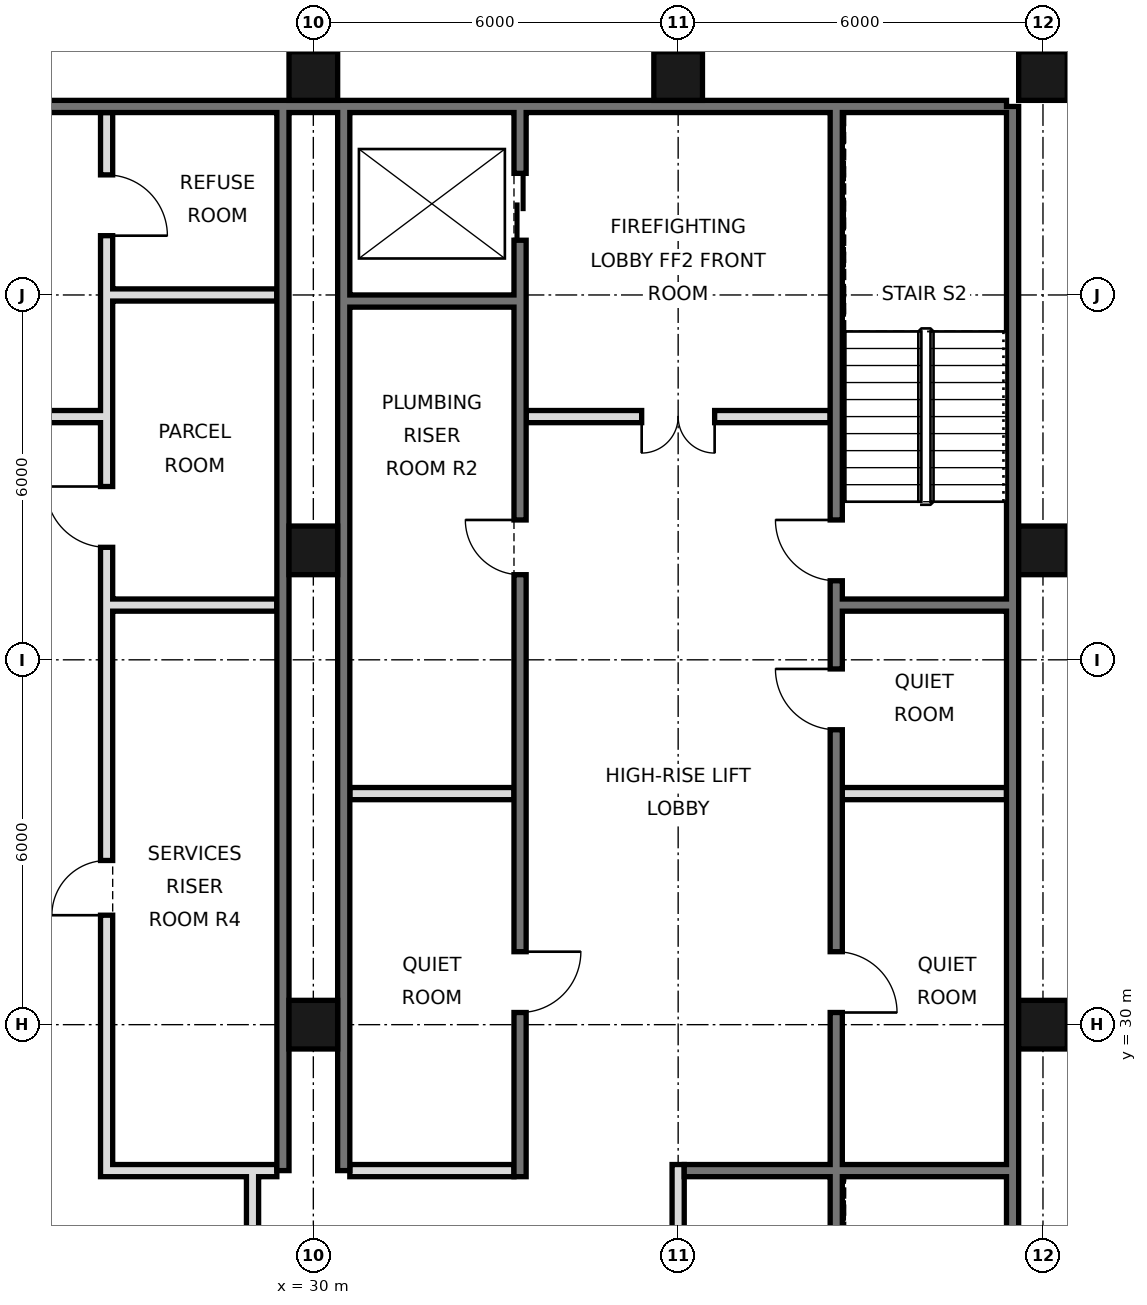
"""IFC4 building model, lengths in metres.
Left out: names, types, materials, properties, quantities, classifications, styles, units other than length and angle.
Written with IfcOpenShell. Run it as: python <this file> out.ifc"""

import sys

from ifc_helpers import new_model, si_unit, direction, frame, frame_2d, origin, origin_2d, place, context, subcontext, project, spatial, rectangle, hollow_rectangle, extrude, element, fill, save


model = new_model("IFC4")
c1 = context("Model", 3, precision=1e-05, world=origin(), true_north=direction((0.0, 1.0)))
c2 = subcontext(c1, "Body", "Model", "MODEL_VIEW")
j1 = project(units=[si_unit("LENGTHUNIT", "METRE"), si_unit("PLANEANGLEUNIT", "RADIAN")], contexts=[c1])
p1 = place(None, origin())
s1 = spatial("IfcSite", under=j1, at=p1, CompositionType="ELEMENT")
p2 = place(p1, origin())
s2 = spatial("IfcBuilding", under=s1, at=p2, CompositionType="ELEMENT")
p3 = place(p2, frame((0.0, 0.0, 53.4)))
s3 = spatial("IfcBuildingStorey", under=s2, at=p3, CompositionType="ELEMENT", Elevation=53.4)
for number, where, z_axis, x_axis in (
    (1, (30.0, 30.0, 0.0), (0.0, 0.0, 1.0), (1.0, 0.0, 0.0)),
    (2, (30.0, 37.8, 0.0), (0.0, 0.0, 1.0), (1.0, 0.0, 0.0)),
    (3, (30.0, 45.6, 0.0), (0.0, 0.0, 1.0), (1.0, 0.0, 0.0)),
    (4, (36.0, 45.6, 0.0), (0.0, 0.0, 1.0), (1.0, 0.0, 0.0)),
    (5, (42.0, 30.0, 0.0), (0.0, 0.0, 1.0), (1.0, 0.0, 0.0)),
    (6, (42.0, 37.8, 0.0), (0.0, 0.0, 1.0), (1.0, 0.0, 0.0)),
    (7, (42.0, 45.6, 0.0), (0.0, 0.0, 1.0), (1.0, 0.0, 0.0)),
):
    element("IfcColumn", number, at=place(p3, frame(where, z_axis=z_axis, x_axis=x_axis)), inside=s3, PredefinedType="COLUMN", context=c2, shape_type="SweptSolid", body=[
        extrude(hollow_rectangle(XDim=0.8, YDim=0.8, WallThickness=0.06, at=origin_2d()), origin(), (0.0, 0.0, 1.0), 3.6),
    ])
p4 = place(p3, frame((41.5, 21.6, 0.0), z_axis=(0.0, 0.0, 1.0), x_axis=(0.0, 1.0, 0.0)))
e8 = element("IfcWall", 8, at=p4, inside=s3, PredefinedType="SOLIDWALL", context=c2, shape_type="SweptSolid", body=[
    extrude(rectangle(XDim=23.5, YDim=0.2, at=frame_2d((11.75, 0.0))), origin(), (0.0, 0.0, 1.0), 3.42),
])
p5 = place(p3, frame((6.6, 45.1, 0.0), z_axis=(0.0, 0.0, 1.0), x_axis=(1.0, 0.0, 0.0)))
e9 = element("IfcWall", 9, at=p5, inside=s3, PredefinedType="SOLIDWALL", context=c2, shape_type="SweptSolid", body=[
    extrude(rectangle(XDim=34.8, YDim=0.2, at=frame_2d((17.4, 0.0))), origin(), (0.0, 0.0, 1.0), 3.42),
])
for number, where, z_axis, x_axis in (
    (10, (29.5, 27.6, 0.0), (0.0, 0.0, 1.0), (0.0, 1.0, 0.0)),
    (11, (30.5, 27.6, 0.0), (0.0, 0.0, 1.0), (0.0, 1.0, 0.0)),
):
    element("IfcWall", number, at=place(p3, frame(where, z_axis=z_axis, x_axis=x_axis)), inside=s3, PredefinedType="SOLIDWALL", context=c2, shape_type="SweptSolid", body=[
        extrude(rectangle(XDim=17.5, YDim=0.2, at=frame_2d((8.75, 0.0))), origin(), (0.0, 0.0, 1.0), 3.42),
    ])
p6 = place(p3, frame((29.0, 21.6, 0.0), z_axis=(0.0, 0.0, 1.0), x_axis=(0.0, 1.0, 0.0)))
e12 = element("IfcWall", 12, at=p6, inside=s3, PredefinedType="PARTITIONING", context=c2, shape_type="SweptSolid", body=[
    extrude(rectangle(XDim=6.0, YDim=0.2, at=frame_2d((3.0, 0.0))), origin(), (0.0, 0.0, 1.0), 3.42),
])
p7 = place(p6, frame((2.1, 0.0, 0.0)))
e13 = element("IfcOpeningElement", 13, at=p7, cuts=e12, PredefinedType="OPENING", context=c2, shape_type="SweptSolid", body=[
    extrude(rectangle(XDim=1.8, YDim=2.1, at=frame_2d((0.9, 1.05))), frame((0.0, 0.11, 0.0), z_axis=(0.0, -1.0, 0.0), x_axis=(1.0, 0.0, 0.0)), (0.0, 0.0, 1.0), 0.22),
])
p8 = place(p3, frame((26.6, 27.5, 0.0), z_axis=(0.0, 0.0, 1.0), x_axis=(0.0, 1.0, 0.0)))
e14 = element("IfcWall", 14, at=p8, inside=s3, PredefinedType="SOLIDWALL", context=c2, shape_type="SweptSolid", body=[
    extrude(rectangle(XDim=17.5, YDim=0.2, at=frame_2d((8.75, 0.0))), origin(), (0.0, 0.0, 1.0), 3.42),
])
p9 = place(p8, frame((4.3, 0.0, 0.0)))
e15 = element("IfcOpeningElement", 15, at=p9, cuts=e14, PredefinedType="OPENING", context=c2, shape_type="SweptSolid", body=[
    extrude(rectangle(XDim=0.9, YDim=2.1, at=frame_2d((0.45, 1.05))), frame((0.0, 0.11, 0.0), z_axis=(0.0, -1.0, 0.0), x_axis=(1.0, 0.0, 0.0)), (0.0, 0.0, 1.0), 0.22),
])
p10 = place(p8, frame((10.35, 0.0, 0.0)))
e16 = element("IfcOpeningElement", 16, at=p10, cuts=e14, PredefinedType="OPENING", context=c2, shape_type="SweptSolid", body=[
    extrude(rectangle(XDim=1.0, YDim=2.1, at=frame_2d((0.5, 1.05))), frame((0.0, 0.11, 0.0), z_axis=(0.0, -1.0, 0.0), x_axis=(1.0, 0.0, 0.0)), (0.0, 0.0, 1.0), 0.22),
])
p11 = place(p8, frame((15.475, 0.0, 0.0)))
e17 = element("IfcOpeningElement", 17, at=p11, cuts=e14, PredefinedType="OPENING", context=c2, shape_type="SweptSolid", body=[
    extrude(rectangle(XDim=1.0, YDim=2.1, at=frame_2d((0.5, 1.05))), frame((0.0, 0.11, 0.0), z_axis=(0.0, -1.0, 0.0), x_axis=(1.0, 0.0, 0.0)), (0.0, 0.0, 1.0), 0.22),
])
p12 = place(p3, frame((33.4, 27.5, 0.0), z_axis=(0.0, 0.0, 1.0), x_axis=(0.0, 1.0, 0.0)))
e18 = element("IfcWall", 18, at=p12, inside=s3, PredefinedType="SOLIDWALL", context=c2, shape_type="SweptSolid", body=[
    extrude(rectangle(XDim=17.5, YDim=0.2, at=frame_2d((8.75, 0.0))), origin(), (0.0, 0.0, 1.0), 3.42),
])
p13 = place(p12, frame((15.4, 0.0, 0.0)))
e19 = element("IfcOpeningElement", 19, at=p13, cuts=e18, PredefinedType="OPENING", context=c2, shape_type="SweptSolid", body=[
    extrude(rectangle(XDim=1.1, YDim=2.1, at=frame_2d((0.55, 1.05))), frame((0.0, 0.11, 0.0), z_axis=(0.0, -1.0, 0.0), x_axis=(1.0, 0.0, 0.0)), (0.0, 0.0, 1.0), 0.22),
])
p14 = place(p12, frame((2.7, 0.0, 0.0)))
e20 = element("IfcOpeningElement", 20, at=p14, cuts=e18, PredefinedType="OPENING", context=c2, shape_type="SweptSolid", body=[
    extrude(rectangle(XDim=1.0, YDim=2.1, at=frame_2d((0.5, 1.05))), frame((0.0, 0.11, 0.0), z_axis=(0.0, -1.0, 0.0), x_axis=(1.0, 0.0, 0.0)), (0.0, 0.0, 1.0), 0.22),
])
p15 = place(p12, frame((9.9, 0.0, 0.0)))
e21 = element("IfcOpeningElement", 21, at=p15, cuts=e18, PredefinedType="OPENING", context=c2, shape_type="SweptSolid", body=[
    extrude(rectangle(XDim=0.9, YDim=2.1, at=frame_2d((0.45, 1.05))), frame((0.0, 0.11, 0.0), z_axis=(0.0, -1.0, 0.0), x_axis=(1.0, 0.0, 0.0)), (0.0, 0.0, 1.0), 0.22),
])
p16 = place(p3, frame((36.0, 21.6, 0.0), z_axis=(0.0, 0.0, 1.0), x_axis=(0.0, 1.0, 0.0)))
e22 = element("IfcWall", 22, at=p16, inside=s3, PredefinedType="PARTITIONING", context=c2, shape_type="SweptSolid", body=[
    extrude(rectangle(XDim=6.1, YDim=0.2, at=frame_2d((3.05, 0.0))), origin(), (0.0, 0.0, 1.0), 3.42),
])
p17 = place(p3, frame((38.6, 21.6, 0.0), z_axis=(0.0, 0.0, 1.0), x_axis=(0.0, 1.0, 0.0)))
e23 = element("IfcWall", 23, at=p17, inside=s3, PredefinedType="SOLIDWALL", context=c2, shape_type="SweptSolid", body=[
    extrude(rectangle(XDim=23.4, YDim=0.2, at=frame_2d((11.7, 0.0))), origin(), (0.0, 0.0, 1.0), 3.42),
])
p18 = place(p17, frame((8.6, 0.0, 0.0)))
e24 = element("IfcOpeningElement", 24, at=p18, cuts=e23, PredefinedType="OPENING", context=c2, shape_type="SweptSolid", body=[
    extrude(rectangle(XDim=1.0, YDim=2.1, at=frame_2d((0.5, 1.05))), frame((0.0, 0.11, 0.0), z_axis=(0.0, -1.0, 0.0), x_axis=(1.0, 0.0, 0.0)), (0.0, 0.0, 1.0), 0.22),
])
p19 = place(p17, frame((13.25, 0.0, 0.0)))
e25 = element("IfcOpeningElement", 25, at=p19, cuts=e23, PredefinedType="OPENING", context=c2, shape_type="SweptSolid", body=[
    extrude(rectangle(XDim=1.0, YDim=2.1, at=frame_2d((0.5, 1.05))), frame((0.0, 0.11, 0.0), z_axis=(0.0, -1.0, 0.0), x_axis=(1.0, 0.0, 0.0)), (0.0, 0.0, 1.0), 0.22),
])
p20 = place(p17, frame((15.7, 0.0, 0.0)))
e26 = element("IfcOpeningElement", 26, at=p20, cuts=e23, PredefinedType="OPENING", context=c2, shape_type="SweptSolid", body=[
    extrude(rectangle(XDim=1.0, YDim=2.1, at=frame_2d((0.5, 1.05))), frame((0.0, 0.11, 0.0), z_axis=(0.0, -1.0, 0.0), x_axis=(1.0, 0.0, 0.0)), (0.0, 0.0, 1.0), 0.22),
])
p21 = place(p17, frame((0.175, 0.0, 0.0)))
e27 = element("IfcOpeningElement", 27, at=p21, cuts=e23, PredefinedType="OPENING", context=c2, shape_type="SweptSolid", body=[
    extrude(rectangle(XDim=0.9, YDim=2.1, at=frame_2d((0.45, 1.05))), frame((0.0, 0.11, 0.0), z_axis=(0.0, -1.0, 0.0), x_axis=(1.0, 0.0, 0.0)), (0.0, 0.0, 1.0), 0.22),
])
p22 = place(p3, frame((26.7, 27.6, 0.0), z_axis=(0.0, 0.0, 1.0), x_axis=(1.0, 0.0, 0.0)))
e28 = element("IfcWall", 28, at=p22, inside=s3, PredefinedType="SOLIDWALL", context=c2, shape_type="SweptSolid", body=[
    extrude(rectangle(XDim=2.7, YDim=0.2, at=frame_2d((1.35, 0.0))), origin(), (0.0, 0.0, 1.0), 3.42),
])
p23 = place(p3, frame((30.6, 27.6, 0.0), z_axis=(0.0, 0.0, 1.0), x_axis=(1.0, 0.0, 0.0)))
e29 = element("IfcWall", 29, at=p23, inside=s3, PredefinedType="PARTITIONING", context=c2, shape_type="SweptSolid", body=[
    extrude(rectangle(XDim=2.7, YDim=0.2, at=frame_2d((1.35, 0.0))), origin(), (0.0, 0.0, 1.0), 3.42),
])
p24 = place(p3, frame((36.1, 27.6, 0.0), z_axis=(0.0, 0.0, 1.0), x_axis=(1.0, 0.0, 0.0)))
e30 = element("IfcWall", 30, at=p24, inside=s3, PredefinedType="SOLIDWALL", context=c2, shape_type="SweptSolid", body=[
    extrude(rectangle(XDim=5.3, YDim=0.2, at=frame_2d((2.65, 0.0))), origin(), (0.0, 0.0, 1.0), 3.42),
])
p25 = place(p3, frame((30.6, 33.8, 0.0), z_axis=(0.0, 0.0, 1.0), x_axis=(1.0, 0.0, 0.0)))
e31 = element("IfcWall", 31, at=p25, inside=s3, PredefinedType="SOLIDWALL", context=c2, shape_type="SweptSolid", body=[
    extrude(rectangle(XDim=2.7, YDim=0.2, at=frame_2d((1.35, 0.0))), origin(), (0.0, 0.0, 1.0), 3.42),
])
p26 = place(p3, frame((38.7, 33.8, 0.0), z_axis=(0.0, 0.0, 1.0), x_axis=(1.0, 0.0, 0.0)))
e32 = element("IfcWall", 32, at=p26, inside=s3, PredefinedType="PARTITIONING", context=c2, shape_type="SweptSolid", body=[
    extrude(rectangle(XDim=2.7, YDim=0.2, at=frame_2d((1.35, 0.0))), origin(), (0.0, 0.0, 1.0), 3.42),
])
for number, where, z_axis, x_axis in (
    (33, (26.7, 36.9, 0.0), (0.0, 0.0, 1.0), (1.0, 0.0, 0.0)),
    (34, (38.7, 36.9, 0.0), (0.0, 0.0, 1.0), (1.0, 0.0, 0.0)),
):
    element("IfcWall", number, at=place(p3, frame(where, z_axis=z_axis, x_axis=x_axis)), inside=s3, PredefinedType="SOLIDWALL", context=c2, shape_type="SweptSolid", body=[
        extrude(rectangle(XDim=2.7, YDim=0.2, at=frame_2d((1.35, 0.0))), origin(), (0.0, 0.0, 1.0), 3.42),
    ])
p27 = place(p3, frame((21.5, 40.0, 0.0), z_axis=(0.0, 0.0, 1.0), x_axis=(1.0, 0.0, 0.0)))
e35 = element("IfcWall", 35, at=p27, inside=s3, PredefinedType="PARTITIONING", context=c2, shape_type="SweptSolid", body=[
    extrude(rectangle(XDim=5.0, YDim=0.2, at=frame_2d((2.5, 0.0))), origin(), (0.0, 0.0, 1.0), 3.42),
])
p28 = place(p27, frame((1.9, 0.0, 0.0)))
e36 = element("IfcOpeningElement", 36, at=p28, cuts=e35, PredefinedType="OPENING", context=c2, shape_type="SweptSolid", body=[
    extrude(rectangle(XDim=1.2, YDim=2.1, at=frame_2d((0.6, 1.05))), frame((0.0, 0.11, 0.0), z_axis=(0.0, -1.0, 0.0), x_axis=(1.0, 0.0, 0.0)), (0.0, 0.0, 1.0), 0.22),
])
p29 = place(p3, frame((33.5, 40.0, 0.0), z_axis=(0.0, 0.0, 1.0), x_axis=(1.0, 0.0, 0.0)))
e37 = element("IfcWall", 37, at=p29, inside=s3, PredefinedType="PARTITIONING", context=c2, shape_type="SweptSolid", body=[
    extrude(rectangle(XDim=5.0, YDim=0.2, at=frame_2d((2.5, 0.0))), origin(), (0.0, 0.0, 1.0), 3.42),
])
p30 = place(p29, frame((1.9, 0.0, 0.0)))
e38 = element("IfcOpeningElement", 38, at=p30, cuts=e37, PredefinedType="OPENING", context=c2, shape_type="SweptSolid", body=[
    extrude(rectangle(XDim=1.2, YDim=2.1, at=frame_2d((0.6, 1.05))), frame((0.0, 0.11, 0.0), z_axis=(0.0, -1.0, 0.0), x_axis=(1.0, 0.0, 0.0)), (0.0, 0.0, 1.0), 0.22),
])
p31 = place(p3, frame((30.6, 41.9, 0.0), z_axis=(0.0, 0.0, 1.0), x_axis=(1.0, 0.0, 0.0)))
e39 = element("IfcWall", 39, at=p31, inside=s3, PredefinedType="SOLIDWALL", context=c2, shape_type="SweptSolid", body=[
    extrude(rectangle(XDim=2.7, YDim=0.2, at=frame_2d((1.35, 0.0))), origin(), (0.0, 0.0, 1.0), 3.42),
])
p32 = place(p3, frame((26.7, 42.0, 0.0), z_axis=(0.0, 0.0, 1.0), x_axis=(1.0, 0.0, 0.0)))
e40 = element("IfcWall", 40, at=p32, inside=s3, PredefinedType="PARTITIONING", context=c2, shape_type="SweptSolid", body=[
    extrude(rectangle(XDim=2.7, YDim=0.2, at=frame_2d((1.35, 0.0))), origin(), (0.0, 0.0, 1.0), 3.42),
])
p33 = place(p30, frame((1.2, 0.0, 0.0), z_axis=(0.0, 0.0, 1.0), x_axis=(-1.0, 0.0, 0.0)))
e41 = element("IfcDoor", 41, at=p33, inside=s3, OperationType="DOUBLE_DOOR_SINGLE_SWING", PredefinedType="DOOR", context=c2, shape_type="SweptSolid", body=[
    extrude(rectangle(XDim=1.2, YDim=2.1, at=frame_2d((0.6, 1.05))), frame((0.0, 0.025, 0.0), z_axis=(0.0, -1.0, 0.0), x_axis=(1.0, 0.0, 0.0)), (0.0, 0.0, 1.0), 0.05),
])
fill(e38, e41)
p34 = place(p13, origin())
e42 = element("IfcDoor", 42, at=p34, inside=s3, OperationType="DOUBLE_DOOR_SLIDING", PredefinedType="DOOR", context=c2, shape_type="SweptSolid", body=[
    extrude(rectangle(XDim=1.1, YDim=2.1, at=frame_2d((0.55, 1.05))), frame((0.0, 0.025, 0.0), z_axis=(0.0, -1.0, 0.0), x_axis=(1.0, 0.0, 0.0)), (0.0, 0.0, 1.0), 0.05),
])
fill(e19, e42)
p35 = place(p18, frame((1.0, 0.0, 0.0), z_axis=(0.0, 0.0, 1.0), x_axis=(-1.0, 0.0, 0.0)))
e43 = element("IfcDoor", 43, at=p35, inside=s3, OperationType="SINGLE_SWING_RIGHT", PredefinedType="DOOR", context=c2, shape_type="SweptSolid", body=[
    extrude(rectangle(XDim=1.0, YDim=2.1, at=frame_2d((0.5, 1.05))), frame((0.0, 0.025, 0.0), z_axis=(0.0, -1.0, 0.0), x_axis=(1.0, 0.0, 0.0)), (0.0, 0.0, 1.0), 0.05),
])
fill(e24, e43)
p36 = place(p19, frame((1.0, 0.0, 0.0), z_axis=(0.0, 0.0, 1.0), x_axis=(-1.0, 0.0, 0.0)))
e44 = element("IfcDoor", 44, at=p36, inside=s3, OperationType="SINGLE_SWING_LEFT", PredefinedType="DOOR", context=c2, shape_type="SweptSolid", body=[
    extrude(rectangle(XDim=1.0, YDim=2.1, at=frame_2d((0.5, 1.05))), frame((0.0, 0.025, 0.0), z_axis=(0.0, -1.0, 0.0), x_axis=(1.0, 0.0, 0.0)), (0.0, 0.0, 1.0), 0.05),
])
fill(e25, e44)
p37 = place(p14, origin())
e45 = element("IfcDoor", 45, at=p37, inside=s3, OperationType="SINGLE_SWING_RIGHT", PredefinedType="DOOR", context=c2, shape_type="SweptSolid", body=[
    extrude(rectangle(XDim=1.0, YDim=2.1, at=frame_2d((0.5, 1.05))), frame((0.0, 0.025, 0.0), z_axis=(0.0, -1.0, 0.0), x_axis=(1.0, 0.0, 0.0)), (0.0, 0.0, 1.0), 0.05),
])
fill(e20, e45)
p38 = place(p20, frame((1.0, 0.0, 0.0), z_axis=(0.0, 0.0, 1.0), x_axis=(-1.0, 0.0, 0.0)))
e46 = element("IfcDoor", 46, at=p38, inside=s3, OperationType="SINGLE_SWING_LEFT", PredefinedType="DOOR", context=c2, shape_type="SweptSolid", body=[
    extrude(rectangle(XDim=1.0, YDim=2.1, at=frame_2d((0.5, 1.05))), frame((0.0, 0.025, 0.0), z_axis=(0.0, -1.0, 0.0), x_axis=(1.0, 0.0, 0.0)), (0.0, 0.0, 1.0), 0.05),
])
fill(e26, e46)
p39 = place(p15, frame((0.9, 0.0, 0.0), z_axis=(0.0, 0.0, 1.0), x_axis=(-1.0, 0.0, 0.0)))
e47 = element("IfcDoor", 47, at=p39, inside=s3, OperationType="SINGLE_SWING_LEFT", PredefinedType="DOOR", context=c2, shape_type="SweptSolid", body=[
    extrude(rectangle(XDim=0.9, YDim=2.1, at=frame_2d((0.45, 1.05))), frame((0.0, 0.025, 0.0), z_axis=(0.0, -1.0, 0.0), x_axis=(1.0, 0.0, 0.0)), (0.0, 0.0, 1.0), 0.05),
])
fill(e21, e47)
p40 = place(p9, origin())
e48 = element("IfcDoor", 48, at=p40, inside=s3, OperationType="SINGLE_SWING_LEFT", PredefinedType="DOOR", context=c2, shape_type="SweptSolid", body=[
    extrude(rectangle(XDim=0.9, YDim=2.1, at=frame_2d((0.45, 1.05))), frame((0.0, 0.025, 0.0), z_axis=(0.0, -1.0, 0.0), x_axis=(1.0, 0.0, 0.0)), (0.0, 0.0, 1.0), 0.05),
])
fill(e15, e48)
p41 = place(p10, frame((1.0, 0.0, 0.0), z_axis=(0.0, 0.0, 1.0), x_axis=(-1.0, 0.0, 0.0)))
e49 = element("IfcDoor", 49, at=p41, inside=s3, OperationType="SINGLE_SWING_LEFT", PredefinedType="DOOR", context=c2, shape_type="SweptSolid", body=[
    extrude(rectangle(XDim=1.0, YDim=2.1, at=frame_2d((0.5, 1.05))), frame((0.0, 0.025, 0.0), z_axis=(0.0, -1.0, 0.0), x_axis=(1.0, 0.0, 0.0)), (0.0, 0.0, 1.0), 0.05),
])
fill(e16, e49)
p42 = place(p11, frame((1.0, 0.0, 0.0), z_axis=(0.0, 0.0, 1.0), x_axis=(-1.0, 0.0, 0.0)))
e50 = element("IfcDoor", 50, at=p42, inside=s3, OperationType="SINGLE_SWING_RIGHT", PredefinedType="DOOR", context=c2, shape_type="SweptSolid", body=[
    extrude(rectangle(XDim=1.0, YDim=2.1, at=frame_2d((0.5, 1.05))), frame((0.0, 0.025, 0.0), z_axis=(0.0, -1.0, 0.0), x_axis=(1.0, 0.0, 0.0)), (0.0, 0.0, 1.0), 0.05),
])
fill(e17, e50)
save(model, sys.argv[1])
